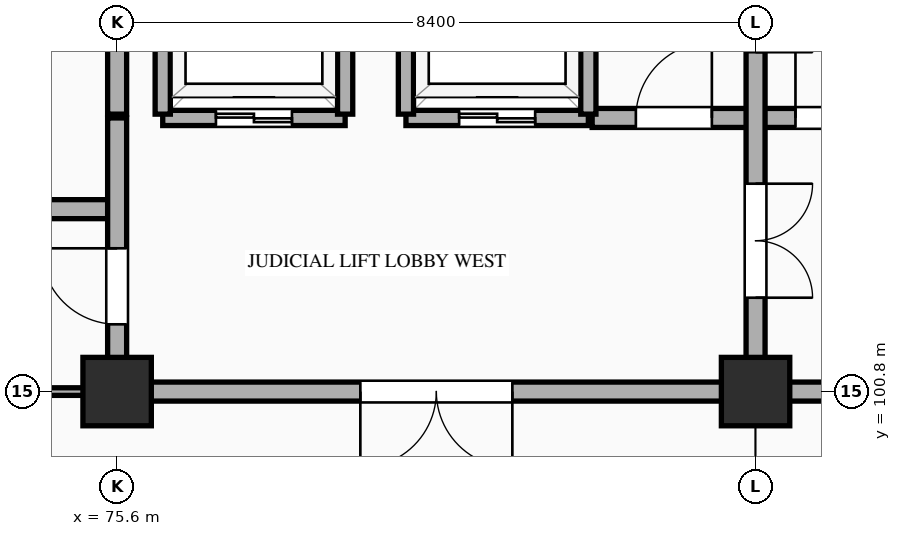
"""IFC4 building model, lengths in metres.
Left out: names, types, materials, properties, quantities, classifications, styles, units other than length and angle.
Written with IfcOpenShell. Run it as: python <this file> out.ifc"""

import sys

from ifc_helpers import new_model, si_unit, direction, frame, frame_2d, origin, origin_2d, place, context, subcontext, project, spatial, rectangle, extrude, element, fill, save


model = new_model("IFC4")
c1 = context("Model", 3, precision=1e-05, world=origin(), true_north=direction((0.0, 1.0)))
c2 = subcontext(c1, "Body", "Model", "MODEL_VIEW")
j1 = project(units=[si_unit("LENGTHUNIT", "METRE"), si_unit("PLANEANGLEUNIT", "RADIAN")], contexts=[c1])
p1 = place(None, origin())
s1 = spatial("IfcSite", under=j1, at=p1, CompositionType="ELEMENT")
p2 = place(p1, origin())
s2 = spatial("IfcBuilding", under=s1, at=p2, CompositionType="ELEMENT")
p3 = place(p2, origin())
s3 = spatial("IfcBuildingStorey", under=s2, at=p3, CompositionType="ELEMENT", Elevation=0.0)
for number, where, z_axis, x_axis in (
    (1, (75.6, 100.8, 0.0), (0.0, 0.0, 1.0), (1.0, 0.0, 0.0)),
    (2, (84.0, 100.8, 0.0), (0.0, 0.0, 1.0), (1.0, 0.0, 0.0)),
):
    element("IfcColumn", number, at=place(p3, frame(where, z_axis=z_axis, x_axis=x_axis)), inside=s3, PredefinedType="COLUMN", context=c2, shape_type="SweptSolid", body=[
        extrude(rectangle(XDim=0.9, YDim=0.9, at=origin_2d()), origin(), (0.0, 0.0, 1.0), 5.4),
    ])
p4 = place(p3, frame((71.4, 100.8, 0.0), z_axis=(0.0, 0.0, 1.0), x_axis=(1.0, 0.0, 0.0)))
e3 = element("IfcWall", 3, at=p4, inside=s3, PredefinedType="STANDARD", context=c2, shape_type="SweptSolid", body=[
    extrude(rectangle(XDim=4.2, YDim=0.1, at=frame_2d((2.1, 0.0))), origin(), (0.0, 0.0, 1.0), 4.27),
])
p5 = place(p4, frame((1.14, 0.0, 0.0)))
e4 = element("IfcOpeningElement", 4, at=p5, cuts=e3, PredefinedType="OPENING", context=c2, shape_type="SweptSolid", body=[
    extrude(rectangle(XDim=1.55, YDim=2.35, at=frame_2d((0.775, 1.175))), frame((0.0, 0.062, 0.0), z_axis=(0.0, -1.0, 0.0), x_axis=(1.0, 0.0, 0.0)), (0.0, 0.0, 1.0), 0.124),
])
p6 = place(p3, frame((75.6, 100.8, 0.0), z_axis=(0.0, 0.0, 1.0), x_axis=(1.0, 0.0, 0.0)))
e5 = element("IfcWall", 5, at=p6, inside=s3, PredefinedType="STANDARD", context=c2, shape_type="SweptSolid", body=[
    extrude(rectangle(XDim=16.8, YDim=0.25, at=frame_2d((8.4, 0.0))), origin(), (0.0, 0.0, 1.0), 4.27),
])
p7 = place(p6, frame((3.2, 0.0, 0.0)))
e6 = element("IfcOpeningElement", 6, at=p7, cuts=e5, PredefinedType="OPENING", context=c2, shape_type="SweptSolid", body=[
    extrude(rectangle(XDim=2.0, YDim=2.4, at=frame_2d((1.0, 1.2))), frame((0.0, 0.137, 0.0), z_axis=(0.0, -1.0, 0.0), x_axis=(1.0, 0.0, 0.0)), (0.0, 0.0, 1.0), 0.274),
])
p8 = place(p6, frame((11.7, 0.0, 0.0)))
e7 = element("IfcOpeningElement", 7, at=p8, cuts=e5, PredefinedType="OPENING", context=c2, shape_type="SweptSolid", body=[
    extrude(rectangle(XDim=1.8, YDim=2.35, at=frame_2d((0.9, 1.175))), frame((0.0, 0.137, 0.0), z_axis=(0.0, -1.0, 0.0), x_axis=(1.0, 0.0, 0.0)), (0.0, 0.0, 1.0), 0.274),
])
p9 = place(p3, frame((71.4, 103.2, 0.0), z_axis=(0.0, 0.0, 1.0), x_axis=(1.0, 0.0, 0.0)))
e8 = element("IfcWall", 8, at=p9, inside=s3, PredefinedType="STANDARD", context=c2, shape_type="SweptSolid", body=[
    extrude(rectangle(XDim=4.2, YDim=0.25, at=frame_2d((2.1, 0.0))), origin(), (0.0, 0.0, 1.0), 5.12),
])
p10 = place(p9, frame((1.55, 0.0, 0.0)))
e9 = element("IfcOpeningElement", 9, at=p10, cuts=e8, PredefinedType="OPENING", context=c2, shape_type="SweptSolid", body=[
    extrude(rectangle(XDim=1.1, YDim=2.2, at=frame_2d((0.55, 1.1))), frame((0.0, 0.137, 0.0), z_axis=(0.0, -1.0, 0.0), x_axis=(1.0, 0.0, 0.0)), (0.0, 0.0, 1.0), 0.274),
])
p11 = place(p3, frame((76.2, 104.4, 0.0), z_axis=(0.0, 0.0, 1.0), x_axis=(1.0, 0.0, 0.0)))
e10 = element("IfcWall", 10, at=p11, inside=s3, PredefinedType="STANDARD", context=c2, shape_type="SweptSolid", body=[
    extrude(rectangle(XDim=2.4, YDim=0.2, at=frame_2d((1.2, 0.0))), origin(), (0.0, 0.0, 1.0), 5.12),
])
p12 = place(p11, frame((0.7, 0.0, 0.0)))
e11 = element("IfcOpeningElement", 11, at=p12, cuts=e10, PredefinedType="OPENING", context=c2, shape_type="SweptSolid", body=[
    extrude(rectangle(XDim=1.0, YDim=2.15, at=frame_2d((0.5, 1.075))), frame((0.0, 0.112, 0.0), z_axis=(0.0, -1.0, 0.0), x_axis=(1.0, 0.0, 0.0)), (0.0, 0.0, 1.0), 0.224),
])
p13 = place(p3, frame((79.4, 104.4, 0.0), z_axis=(0.0, 0.0, 1.0), x_axis=(1.0, 0.0, 0.0)))
e12 = element("IfcWall", 12, at=p13, inside=s3, PredefinedType="STANDARD", context=c2, shape_type="SweptSolid", body=[
    extrude(rectangle(XDim=2.4, YDim=0.2, at=frame_2d((1.2, 0.0))), origin(), (0.0, 0.0, 1.0), 5.12),
])
p14 = place(p13, frame((0.7, 0.0, 0.0)))
e13 = element("IfcOpeningElement", 13, at=p14, cuts=e12, PredefinedType="OPENING", context=c2, shape_type="SweptSolid", body=[
    extrude(rectangle(XDim=1.0, YDim=2.15, at=frame_2d((0.5, 1.075))), frame((0.0, 0.112, 0.0), z_axis=(0.0, -1.0, 0.0), x_axis=(1.0, 0.0, 0.0)), (0.0, 0.0, 1.0), 0.224),
])
p15 = place(p3, frame((81.85, 104.4, 0.0), z_axis=(0.0, 0.0, 1.0), x_axis=(1.0, 0.0, 0.0)))
e14 = element("IfcWall", 14, at=p15, inside=s3, PredefinedType="STANDARD", context=c2, shape_type="SweptSolid", body=[
    extrude(rectangle(XDim=4.3, YDim=0.25, at=frame_2d((2.15, 0.0))), origin(), (0.0, 0.0, 1.0), 5.12),
])
p16 = place(p15, frame((0.575, 0.0, 0.0)))
e15 = element("IfcOpeningElement", 15, at=p16, cuts=e14, PredefinedType="OPENING", context=c2, shape_type="SweptSolid", body=[
    extrude(rectangle(XDim=1.0, YDim=2.2, at=frame_2d((0.5, 1.1))), frame((0.0, 0.137, 0.0), z_axis=(0.0, -1.0, 0.0), x_axis=(1.0, 0.0, 0.0)), (0.0, 0.0, 1.0), 0.274),
])
p17 = place(p15, frame((2.675, 0.0, 0.0)))
e16 = element("IfcOpeningElement", 16, at=p17, cuts=e14, PredefinedType="OPENING", context=c2, shape_type="SweptSolid", body=[
    extrude(rectangle(XDim=1.1, YDim=2.2, at=frame_2d((0.55, 1.1))), frame((0.0, 0.137, 0.0), z_axis=(0.0, -1.0, 0.0), x_axis=(1.0, 0.0, 0.0)), (0.0, 0.0, 1.0), 0.274),
])
p18 = place(p3, frame((75.6, 100.8, 0.0), z_axis=(0.0, 0.0, 1.0), x_axis=(0.0, 1.0, 0.0)))
e17 = element("IfcWall", 17, at=p18, inside=s3, PredefinedType="STANDARD", context=c2, shape_type="SweptSolid", body=[
    extrude(rectangle(XDim=3.6, YDim=0.25, at=frame_2d((1.8, 0.0))), origin(), (0.0, 0.0, 1.0), 4.37),
])
p19 = place(p18, frame((0.885, 0.0, 0.0)))
e18 = element("IfcOpeningElement", 18, at=p19, cuts=e17, PredefinedType="OPENING", context=c2, shape_type="SweptSolid", body=[
    extrude(rectangle(XDim=1.0, YDim=2.2, at=frame_2d((0.5, 1.1))), frame((0.0, 0.137, 0.0), z_axis=(0.0, -1.0, 0.0), x_axis=(1.0, 0.0, 0.0)), (0.0, 0.0, 1.0), 0.274),
])
p20 = place(p3, frame((75.6, 104.45, 0.0), z_axis=(0.0, 0.0, 1.0), x_axis=(0.0, 1.0, 0.0)))
e19 = element("IfcWall", 19, at=p20, inside=s3, PredefinedType="STANDARD", context=c2, shape_type="SweptSolid", body=[
    extrude(rectangle(XDim=3.5, YDim=0.25, at=frame_2d((1.75, 0.0))), origin(), (0.0, 0.0, 1.0), 4.37),
])
for number, where, z_axis, x_axis in (
    (20, (76.2, 104.45, 0.0), (0.0, 0.0, 1.0), (0.0, 1.0, 0.0)),
    (21, (78.6, 104.45, 0.0), (0.0, 0.0, 1.0), (0.0, 1.0, 0.0)),
    (22, (79.4, 104.45, 0.0), (0.0, 0.0, 1.0), (0.0, 1.0, 0.0)),
    (23, (81.8, 104.45, 0.0), (0.0, 0.0, 1.0), (0.0, 1.0, 0.0)),
):
    element("IfcWall", number, at=place(p3, frame(where, z_axis=z_axis, x_axis=x_axis)), inside=s3, PredefinedType="STANDARD", context=c2, shape_type="SweptSolid", body=[
        extrude(rectangle(XDim=2.3, YDim=0.2, at=frame_2d((1.15, 0.0))), origin(), (0.0, 0.0, 1.0), 5.12),
    ])
p21 = place(p3, frame((84.0, 100.8, 0.0), z_axis=(0.0, 0.0, 1.0), x_axis=(0.0, 1.0, 0.0)))
e24 = element("IfcWall", 24, at=p21, inside=s3, PredefinedType="STANDARD", context=c2, shape_type="SweptSolid", body=[
    extrude(rectangle(XDim=14.36, YDim=0.25, at=frame_2d((7.18, 0.0))), origin(), (0.0, 0.0, 1.0), 4.37),
])
p22 = place(p21, frame((1.235, 0.0, 0.0)))
e25 = element("IfcOpeningElement", 25, at=p22, cuts=e24, PredefinedType="OPENING", context=c2, shape_type="SweptSolid", body=[
    extrude(rectangle(XDim=1.5, YDim=2.25, at=frame_2d((0.75, 1.125))), frame((0.0, 0.137, 0.0), z_axis=(0.0, -1.0, 0.0), x_axis=(1.0, 0.0, 0.0)), (0.0, 0.0, 1.0), 0.274),
])
p23 = place(p21, frame((4.465, 0.0, 0.0)))
e26 = element("IfcOpeningElement", 26, at=p23, cuts=e24, PredefinedType="OPENING", context=c2, shape_type="SweptSolid", body=[
    extrude(rectangle(XDim=1.5, YDim=2.25, at=frame_2d((0.75, 1.125))), frame((0.0, 0.137, 0.0), z_axis=(0.0, -1.0, 0.0), x_axis=(1.0, 0.0, 0.0)), (0.0, 0.0, 1.0), 0.274),
])
p24 = place(p21, frame((8.085, 0.0, 0.0)))
e27 = element("IfcOpeningElement", 27, at=p24, cuts=e24, PredefinedType="OPENING", context=c2, shape_type="SweptSolid", body=[
    extrude(rectangle(XDim=1.0, YDim=2.2, at=frame_2d((0.5, 1.1))), frame((0.0, 0.137, 0.0), z_axis=(0.0, -1.0, 0.0), x_axis=(1.0, 0.0, 0.0)), (0.0, 0.0, 1.0), 0.274),
])
p25 = place(p12, origin())
e28 = element("IfcDoor", 28, at=p25, inside=s3, OperationType="DOUBLE_DOOR_SLIDING", PredefinedType="DOOR", context=c2, shape_type="SweptSolid", body=[
    extrude(rectangle(XDim=1.0, YDim=2.15, at=frame_2d((0.5, 1.075))), frame((0.0, 0.025, 0.0), z_axis=(0.0, -1.0, 0.0), x_axis=(1.0, 0.0, 0.0)), (0.0, 0.0, 1.0), 0.05),
])
fill(e11, e28)
p26 = place(p14, origin())
e29 = element("IfcDoor", 29, at=p26, inside=s3, OperationType="DOUBLE_DOOR_SLIDING", PredefinedType="DOOR", context=c2, shape_type="SweptSolid", body=[
    extrude(rectangle(XDim=1.0, YDim=2.15, at=frame_2d((0.5, 1.075))), frame((0.0, 0.025, 0.0), z_axis=(0.0, -1.0, 0.0), x_axis=(1.0, 0.0, 0.0)), (0.0, 0.0, 1.0), 0.05),
])
fill(e13, e29)
p27 = place(p19, origin())
e30 = element("IfcDoor", 30, at=p27, inside=s3, OperationType="SINGLE_SWING_RIGHT", PredefinedType="DOOR", context=c2, shape_type="SweptSolid", body=[
    extrude(rectangle(XDim=1.0, YDim=2.2, at=frame_2d((0.5, 1.1))), frame((0.0, 0.025, 0.0), z_axis=(0.0, -1.0, 0.0), x_axis=(1.0, 0.0, 0.0)), (0.0, 0.0, 1.0), 0.05),
])
fill(e18, e30)
p28 = place(p22, frame((1.5, 0.0, 0.0), z_axis=(0.0, 0.0, 1.0), x_axis=(-1.0, 0.0, 0.0)))
e31 = element("IfcDoor", 31, at=p28, inside=s3, OperationType="DOUBLE_DOOR_SINGLE_SWING", PredefinedType="DOOR", context=c2, shape_type="SweptSolid", body=[
    extrude(rectangle(XDim=1.5, YDim=2.25, at=frame_2d((0.75, 1.125))), frame((0.0, 0.025, 0.0), z_axis=(0.0, -1.0, 0.0), x_axis=(1.0, 0.0, 0.0)), (0.0, 0.0, 1.0), 0.05),
])
fill(e25, e31)
p29 = place(p7, frame((2.0, 0.0, 0.0), z_axis=(0.0, 0.0, 1.0), x_axis=(-1.0, 0.0, 0.0)))
e32 = element("IfcDoor", 32, at=p29, inside=s3, OperationType="DOUBLE_DOOR_SINGLE_SWING", PredefinedType="DOOR", context=c2, shape_type="SweptSolid", body=[
    extrude(rectangle(XDim=2.0, YDim=2.4, at=frame_2d((1.0, 1.2))), frame((0.0, 0.025, 0.0), z_axis=(0.0, -1.0, 0.0), x_axis=(1.0, 0.0, 0.0)), (0.0, 0.0, 1.0), 0.05),
])
fill(e6, e32)
p30 = place(p16, origin())
e33 = element("IfcDoor", 33, at=p30, inside=s3, OperationType="SINGLE_SWING_RIGHT", PredefinedType="DOOR", context=c2, shape_type="SweptSolid", body=[
    extrude(rectangle(XDim=1.0, YDim=2.2, at=frame_2d((0.5, 1.1))), frame((0.0, 0.025, 0.0), z_axis=(0.0, -1.0, 0.0), x_axis=(1.0, 0.0, 0.0)), (0.0, 0.0, 1.0), 0.05),
])
fill(e15, e33)
p31 = place(p17, origin())
e34 = element("IfcDoor", 34, at=p31, inside=s3, OperationType="SINGLE_SWING_LEFT", PredefinedType="DOOR", context=c2, shape_type="SweptSolid", body=[
    extrude(rectangle(XDim=1.1, YDim=2.2, at=frame_2d((0.55, 1.1))), frame((0.0, 0.025, 0.0), z_axis=(0.0, -1.0, 0.0), x_axis=(1.0, 0.0, 0.0)), (0.0, 0.0, 1.0), 0.05),
])
fill(e16, e34)
save(model, sys.argv[1])
